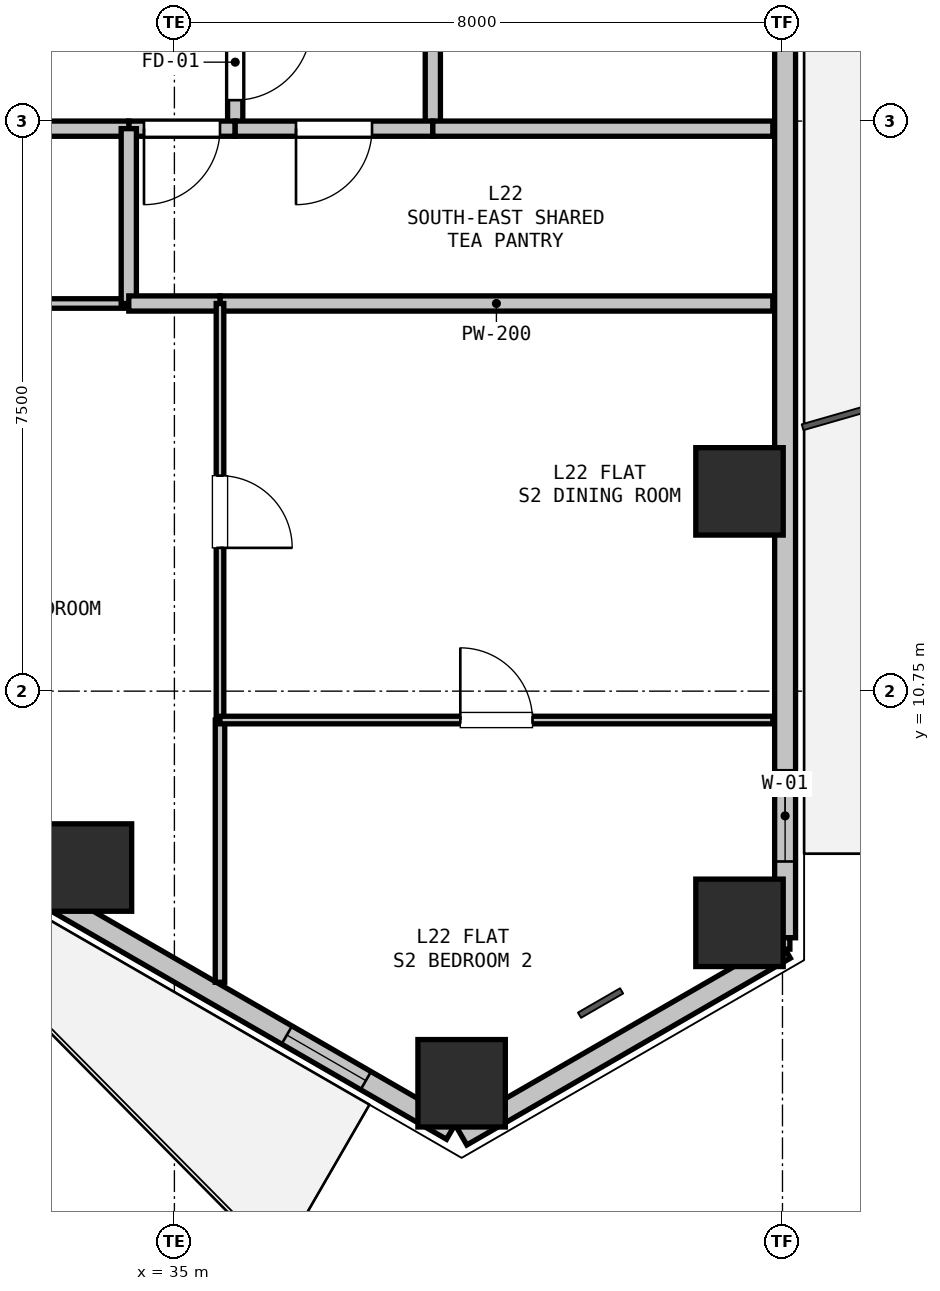
"""IFC4 building model, lengths in metres.
Left out: names, types, materials, properties, quantities, classifications, styles, units other than length and angle.
Written with IfcOpenShell. Run it as: python <this file> out.ifc"""

import sys

from ifc_helpers import new_model, si_unit, direction, frame, frame_2d, origin, origin_2d, place, context, subcontext, project, spatial, rectangle, hollow_rectangle, extrude, element, fill, save


model = new_model("IFC4")
c1 = context("Model", 3, precision=1e-05, world=origin(), true_north=direction((0.0, 1.0)))
c2 = subcontext(c1, "Body", "Model", "MODEL_VIEW")
j1 = project(units=[si_unit("LENGTHUNIT", "METRE"), si_unit("PLANEANGLEUNIT", "RADIAN")], contexts=[c1])
p1 = place(None, origin())
s1 = spatial("IfcSite", under=j1, at=p1, CompositionType="ELEMENT")
p2 = place(p1, origin())
s2 = spatial("IfcBuilding", under=s1, at=p2, CompositionType="ELEMENT")
p3 = place(p2, frame((0.0, 0.0, 83.4)))
s3 = spatial("IfcBuildingStorey", under=s2, at=p3, CompositionType="ELEMENT", Elevation=83.4)
for number, where, z_axis, x_axis in (
    (1, (42.435, 13.378, 0.0), (0.0, 0.0, 1.0), (1.0, 0.0, 0.0)),
    (2, (42.435, 7.702, 0.0), (0.0, 0.0, 1.0), (1.0, 0.0, 0.0)),
    (3, (38.779, 5.591, 0.0), (0.0, 0.0, 1.0), (1.0, 0.0, 0.0)),
    (4, (33.863, 8.429, 0.0), (0.0, 0.0, 1.0), (1.0, 0.0, 0.0)),
):
    element("IfcColumn", number, at=place(p3, frame(where, z_axis=z_axis, x_axis=x_axis)), inside=s3, PredefinedType="COLUMN", context=c2, shape_type="SweptSolid", body=[
        extrude(hollow_rectangle(XDim=1.15, YDim=1.15, WallThickness=0.032, at=origin_2d()), origin(), (0.0, 0.0, 1.0), 3.3),
    ])
p4 = place(p3, frame((43.035, 7.356, 0.0), z_axis=(0.0, 0.0, 1.0), x_axis=(-0.866011848704, -0.500023477353, 0.0)))
e5 = element("IfcWall", 5, at=p4, inside=s3, PredefinedType="SOLIDWALL", context=c2, shape_type="SweptSolid", body=[
    extrude(rectangle(XDim=4.914, YDim=0.275, at=frame_2d((2.457, 0.0))), origin(), (0.0, 0.0, 1.0), 2.67),
])
p5 = place(p3, frame((43.035, 19.435, 0.0), z_axis=(0.0, 0.0, 1.0), x_axis=(0.0, -1.0, 0.0)))
e6 = element("IfcWall", 6, at=p5, inside=s3, PredefinedType="SOLIDWALL", context=c2, shape_type="SweptSolid", body=[
    extrude(rectangle(XDim=11.93, YDim=0.275, at=frame_2d((5.965, 0.0))), origin(), (0.0, 0.0, 1.0), 2.67),
])
p6 = place(p5, frame((9.726, 0.0, 0.9)))
e7 = element("IfcOpeningElement", 7, at=p6, cuts=e6, PredefinedType="OPENING", context=c2, shape_type="SweptSolid", body=[
    extrude(rectangle(XDim=1.2, YDim=1.4, at=frame_2d((0.6, 0.7))), frame((0.0, 0.147, 0.0), z_axis=(0.0, -1.0, 0.0), x_axis=(1.0, 0.0, 0.0)), (0.0, 0.0, 1.0), 0.295),
])
p7 = place(p3, frame((38.649, 4.973, 0.0), z_axis=(0.0, 0.0, 1.0), x_axis=(-0.866023023012, 0.500004123596, 0.0)))
e8 = element("IfcWall", 8, at=p7, inside=s3, PredefinedType="SOLIDWALL", context=c2, shape_type="SweptSolid", body=[
    extrude(rectangle(XDim=11.93, YDim=0.275, at=frame_2d((5.965, 0.0))), origin(), (0.0, 0.0, 1.0), 2.67),
])
p8 = place(p7, frame((7.616, 0.0, 0.0)))
e9 = element("IfcOpeningElement", 9, at=p8, cuts=e8, PredefinedType="OPENING", context=c2, shape_type="SweptSolid", body=[
    extrude(rectangle(XDim=1.0, YDim=2.1, at=frame_2d((0.5, 1.05))), frame((0.0, 0.147, 0.0), z_axis=(0.0, -1.0, 0.0), x_axis=(1.0, 0.0, 0.0)), (0.0, 0.0, 1.0), 0.295),
])
p9 = place(p7, frame((1.305, 0.0, 0.9)))
e10 = element("IfcOpeningElement", 10, at=p9, cuts=e8, PredefinedType="OPENING", context=c2, shape_type="SweptSolid", body=[
    extrude(rectangle(XDim=1.2, YDim=1.4, at=frame_2d((0.6, 0.7))), frame((0.0, 0.147, 0.0), z_axis=(0.0, -1.0, 0.0), x_axis=(1.0, 0.0, 0.0)), (0.0, 0.0, 1.0), 0.295),
])
p10 = place(p3, frame((35.8, 19.9, 0.0), z_axis=(0.0, 0.0, 1.0), x_axis=(0.0, -1.0, 0.0)))
e11 = element("IfcWall", 11, at=p10, inside=s3, PredefinedType="PARTITIONING", context=c2, shape_type="SweptSolid", body=[
    extrude(rectangle(XDim=1.75, YDim=0.2, at=frame_2d((0.875, 0.0))), origin(), (0.0, 0.0, 1.0), 3.05),
])
p11 = place(p10, frame((0.375, 0.0, 0.0)))
e12 = element("IfcOpeningElement", 12, at=p11, cuts=e11, PredefinedType="OPENING", context=c2, shape_type="SweptSolid", body=[
    extrude(rectangle(XDim=1.0, YDim=2.15, at=frame_2d((0.5, 1.075))), frame((0.0, 0.11, 0.0), z_axis=(0.0, -1.0, 0.0), x_axis=(1.0, 0.0, 0.0)), (0.0, 0.0, 1.0), 0.22),
])
p12 = place(p3, frame((35.8, 18.15, 0.0), z_axis=(0.0, 0.0, 1.0), x_axis=(-1.0, 0.0, 0.0)))
e13 = element("IfcWall", 13, at=p12, inside=s3, PredefinedType="PARTITIONING", context=c2, shape_type="SweptSolid", body=[
    extrude(rectangle(XDim=1.4, YDim=0.2, at=frame_2d((0.7, 0.0))), origin(), (0.0, 0.0, 1.0), 3.05),
])
p13 = place(p12, frame((0.2, 0.0, 0.0)))
e14 = element("IfcOpeningElement", 14, at=p13, cuts=e13, PredefinedType="OPENING", context=c2, shape_type="SweptSolid", body=[
    extrude(rectangle(XDim=1.0, YDim=2.15, at=frame_2d((0.5, 1.075))), frame((0.0, 0.11, 0.0), z_axis=(0.0, -1.0, 0.0), x_axis=(1.0, 0.0, 0.0)), (0.0, 0.0, 1.0), 0.22),
])
p14 = place(p3, frame((34.4, 18.15, 0.0), z_axis=(0.0, 0.0, 1.0), x_axis=(-1.0, 0.0, 0.0)))
e15 = element("IfcWall", 15, at=p14, inside=s3, PredefinedType="PARTITIONING", context=c2, shape_type="SweptSolid", body=[
    extrude(rectangle(XDim=4.0, YDim=0.2, at=frame_2d((2.0, 0.0))), origin(), (0.0, 0.0, 1.0), 3.05),
])
p15 = place(p3, frame((38.4, 23.0, 0.0), z_axis=(0.0, 0.0, 1.0), x_axis=(0.0, -1.0, 0.0)))
e16 = element("IfcWall", 16, at=p15, inside=s3, PredefinedType="PARTITIONING", context=c2, shape_type="SweptSolid", body=[
    extrude(rectangle(XDim=4.85, YDim=0.2, at=frame_2d((2.425, 0.0))), origin(), (0.0, 0.0, 1.0), 3.05),
])
p16 = place(p15, frame((2.0, 0.0, 0.0)))
e17 = element("IfcOpeningElement", 17, at=p16, cuts=e16, PredefinedType="OPENING", context=c2, shape_type="SweptSolid", body=[
    extrude(rectangle(XDim=0.85, YDim=2.1, at=frame_2d((0.425, 1.05))), frame((0.0, 0.11, 0.0), z_axis=(0.0, -1.0, 0.0), x_axis=(1.0, 0.0, 0.0)), (0.0, 0.0, 1.0), 0.22),
])
p17 = place(p3, frame((38.4, 18.15, 0.0), z_axis=(0.0, 0.0, 1.0), x_axis=(-1.0, 0.0, 0.0)))
e18 = element("IfcWall", 18, at=p17, inside=s3, PredefinedType="PARTITIONING", context=c2, shape_type="SweptSolid", body=[
    extrude(rectangle(XDim=2.6, YDim=0.2, at=frame_2d((1.3, 0.0))), origin(), (0.0, 0.0, 1.0), 2.423),
])
p18 = place(p17, frame((0.8, 0.0, 0.0)))
e19 = element("IfcOpeningElement", 19, at=p18, cuts=e18, PredefinedType="OPENING", context=c2, shape_type="SweptSolid", body=[
    extrude(rectangle(XDim=1.0, YDim=2.15, at=frame_2d((0.5, 1.075))), frame((0.0, 0.11, 0.0), z_axis=(0.0, -1.0, 0.0), x_axis=(1.0, 0.0, 0.0)), (0.0, 0.0, 1.0), 0.22),
])
p19 = place(p3, frame((34.4, 15.85, 0.0), z_axis=(0.0, 0.0, 1.0), x_axis=(-1.0, 0.0, 0.0)))
e20 = element("IfcWall", 20, at=p19, inside=s3, PredefinedType="PARTITIONING", context=c2, shape_type="SweptSolid", body=[
    extrude(rectangle(XDim=4.0, YDim=0.125, at=frame_2d((2.0, 0.0))), origin(), (0.0, 0.0, 1.0), 3.05),
])
p20 = place(p19, frame((1.55, 0.0, 0.0)))
e21 = element("IfcOpeningElement", 21, at=p20, cuts=e20, PredefinedType="OPENING", context=c2, shape_type="SweptSolid", body=[
    extrude(rectangle(XDim=0.9, YDim=2.1, at=frame_2d((0.45, 1.05))), frame((0.0, 0.073, 0.0), z_axis=(0.0, -1.0, 0.0), x_axis=(1.0, 0.0, 0.0)), (0.0, 0.0, 1.0), 0.145),
])
p21 = place(p3, frame((34.4, 18.15, 0.0), z_axis=(0.0, 0.0, 1.0), x_axis=(0.0, -1.0, 0.0)))
e22 = element("IfcWall", 22, at=p21, inside=s3, PredefinedType="PARTITIONING", context=c2, shape_type="SweptSolid", body=[
    extrude(rectangle(XDim=2.3, YDim=0.2, at=frame_2d((1.15, 0.0))), origin(), (0.0, 0.0, 1.0), 3.05),
])
p22 = place(p3, frame((38.4, 18.15, 0.0), z_axis=(0.0, 0.0, 1.0), x_axis=(1.0, 0.0, 0.0)))
e23 = element("IfcWall", 23, at=p22, inside=s3, PredefinedType="PARTITIONING", context=c2, shape_type="SweptSolid", body=[
    extrude(rectangle(XDim=4.473, YDim=0.2, at=frame_2d((2.237, 0.0))), origin(), (0.0, 0.0, 1.0), 2.365),
])
p23 = place(p3, frame((42.873, 15.85, 0.0), z_axis=(0.0, 0.0, 1.0), x_axis=(-1.0, 0.0, 0.0)))
e24 = element("IfcWall", 24, at=p23, inside=s3, PredefinedType="PARTITIONING", context=c2, shape_type="SweptSolid", body=[
    extrude(rectangle(XDim=7.273, YDim=0.2, at=frame_2d((3.636, 0.0))), origin(), (0.0, 0.0, 1.0), 2.365),
])
p24 = place(p3, frame((35.6, 15.85, 0.0), z_axis=(0.0, 0.0, 1.0), x_axis=(-1.0, 0.0, 0.0)))
e25 = element("IfcWall", 25, at=p24, inside=s3, PredefinedType="PARTITIONING", context=c2, shape_type="SweptSolid", body=[
    extrude(rectangle(XDim=1.2, YDim=0.2, at=frame_2d((0.6, 0.0))), origin(), (0.0, 0.0, 1.0), 3.05),
])
p25 = place(p3, frame((35.6, 15.85, 0.0), z_axis=(0.0, 0.0, 1.0), x_axis=(0.0, -1.0, 0.0)))
e26 = element("IfcWall", 26, at=p25, inside=s3, PredefinedType="PARTITIONING", context=c2, shape_type="SweptSolid", body=[
    extrude(rectangle(XDim=5.48, YDim=0.1, at=frame_2d((2.74, 0.0))), origin(), (0.0, 0.0, 1.0), 3.05),
])
p26 = place(p25, frame((2.265, 0.0, 0.0)))
e27 = element("IfcOpeningElement", 27, at=p26, cuts=e26, PredefinedType="OPENING", context=c2, shape_type="SweptSolid", body=[
    extrude(rectangle(XDim=0.95, YDim=2.1, at=frame_2d((0.475, 1.05))), frame((0.0, 0.06, 0.0), z_axis=(0.0, -1.0, 0.0), x_axis=(1.0, 0.0, 0.0)), (0.0, 0.0, 1.0), 0.12),
])
p27 = place(p3, frame((35.6, 10.37, 0.0), z_axis=(0.0, 0.0, 1.0), x_axis=(0.0, -1.0, 0.0)))
e28 = element("IfcWall", 28, at=p27, inside=s3, PredefinedType="PARTITIONING", context=c2, shape_type="SweptSolid", body=[
    extrude(rectangle(XDim=3.45, YDim=0.125, at=frame_2d((1.725, 0.0))), origin(), (0.0, 0.0, 1.0), 2.66),
])
p28 = place(p3, frame((35.6, 10.37, 0.0), z_axis=(0.0, 0.0, 1.0), x_axis=(1.0, 0.0, 0.0)))
e29 = element("IfcWall", 29, at=p28, inside=s3, PredefinedType="PARTITIONING", context=c2, shape_type="SweptSolid", body=[
    extrude(rectangle(XDim=7.273, YDim=0.1, at=frame_2d((3.636, 0.0))), origin(), (0.0, 0.0, 1.0), 2.423),
])
p29 = place(p28, frame((3.162, 0.0, 0.0)))
e30 = element("IfcOpeningElement", 30, at=p29, cuts=e29, PredefinedType="OPENING", context=c2, shape_type="SweptSolid", body=[
    extrude(rectangle(XDim=0.95, YDim=2.1, at=frame_2d((0.475, 1.05))), frame((0.0, 0.06, 0.0), z_axis=(0.0, -1.0, 0.0), x_axis=(1.0, 0.0, 0.0)), (0.0, 0.0, 1.0), 0.12),
])
p30 = place(p3, frame((43.035, 7.506, 0.0), z_axis=(0.0, 0.0, 1.0), x_axis=(0.0, -1.0, 0.0)))
e31 = element("IfcWall", 31, at=p30, inside=s3, PredefinedType="PARTITIONING", context=c2, shape_type="SweptSolid", body=[
    extrude(rectangle(XDim=0.15, YDim=0.125, at=frame_2d((0.075, 0.0))), origin(), (0.0, 0.0, 1.0), 3.05),
])
p31 = place(p6, origin())
e32 = element("IfcWindow", 32, at=p31, inside=s3, PartitioningType="SINGLE_PANEL", PredefinedType="WINDOW", context=c2, shape_type="SweptSolid", body=[
    extrude(rectangle(XDim=1.2, YDim=1.4, at=frame_2d((0.6, 0.7))), frame((0.0, 0.03, 0.0), z_axis=(0.0, -1.0, 0.0), x_axis=(1.0, 0.0, 0.0)), (0.0, 0.0, 1.0), 0.06),
])
fill(e7, e32)
p32 = place(p9, origin())
e33 = element("IfcWindow", 33, at=p32, inside=s3, PartitioningType="SINGLE_PANEL", PredefinedType="WINDOW", context=c2, shape_type="SweptSolid", body=[
    extrude(rectangle(XDim=1.2, YDim=1.4, at=frame_2d((0.6, 0.7))), frame((0.0, 0.03, 0.0), z_axis=(0.0, -1.0, 0.0), x_axis=(1.0, 0.0, 0.0)), (0.0, 0.0, 1.0), 0.06),
])
fill(e10, e33)
p33 = place(p11, origin())
e34 = element("IfcDoor", 34, at=p33, inside=s3, OperationType="SINGLE_SWING_LEFT", PredefinedType="DOOR", context=c2, shape_type="SweptSolid", body=[
    extrude(rectangle(XDim=1.0, YDim=2.15, at=frame_2d((0.5, 1.075))), frame((0.0, 0.025, 0.0), z_axis=(0.0, -1.0, 0.0), x_axis=(1.0, 0.0, 0.0)), (0.0, 0.0, 1.0), 0.05),
])
fill(e12, e34)
p34 = place(p13, origin())
e35 = element("IfcDoor", 35, at=p34, inside=s3, OperationType="SINGLE_SWING_RIGHT", PredefinedType="DOOR", context=c2, shape_type="SweptSolid", body=[
    extrude(rectangle(XDim=1.0, YDim=2.15, at=frame_2d((0.5, 1.075))), frame((0.0, 0.025, 0.0), z_axis=(0.0, -1.0, 0.0), x_axis=(1.0, 0.0, 0.0)), (0.0, 0.0, 1.0), 0.05),
])
fill(e14, e35)
p35 = place(p18, origin())
e36 = element("IfcDoor", 36, at=p35, inside=s3, OperationType="SINGLE_SWING_RIGHT", PredefinedType="DOOR", context=c2, shape_type="SweptSolid", body=[
    extrude(rectangle(XDim=1.0, YDim=2.15, at=frame_2d((0.5, 1.075))), frame((0.0, 0.025, 0.0), z_axis=(0.0, -1.0, 0.0), x_axis=(1.0, 0.0, 0.0)), (0.0, 0.0, 1.0), 0.05),
])
fill(e19, e36)
p36 = place(p26, origin())
e37 = element("IfcDoor", 37, at=p36, inside=s3, OperationType="SINGLE_SWING_RIGHT", PredefinedType="DOOR", context=c2, shape_type="SweptSolid", body=[
    extrude(rectangle(XDim=0.95, YDim=2.1, at=frame_2d((0.475, 1.05))), frame((0.0, 0.025, 0.0), z_axis=(0.0, -1.0, 0.0), x_axis=(1.0, 0.0, 0.0)), (0.0, 0.0, 1.0), 0.05),
])
fill(e27, e37)
p37 = place(p29, origin())
e38 = element("IfcDoor", 38, at=p37, inside=s3, OperationType="SINGLE_SWING_LEFT", PredefinedType="DOOR", context=c2, shape_type="SweptSolid", body=[
    extrude(rectangle(XDim=0.95, YDim=2.1, at=frame_2d((0.475, 1.05))), frame((0.0, 0.025, 0.0), z_axis=(0.0, -1.0, 0.0), x_axis=(1.0, 0.0, 0.0)), (0.0, 0.0, 1.0), 0.05),
])
fill(e30, e38)
save(model, sys.argv[1])
